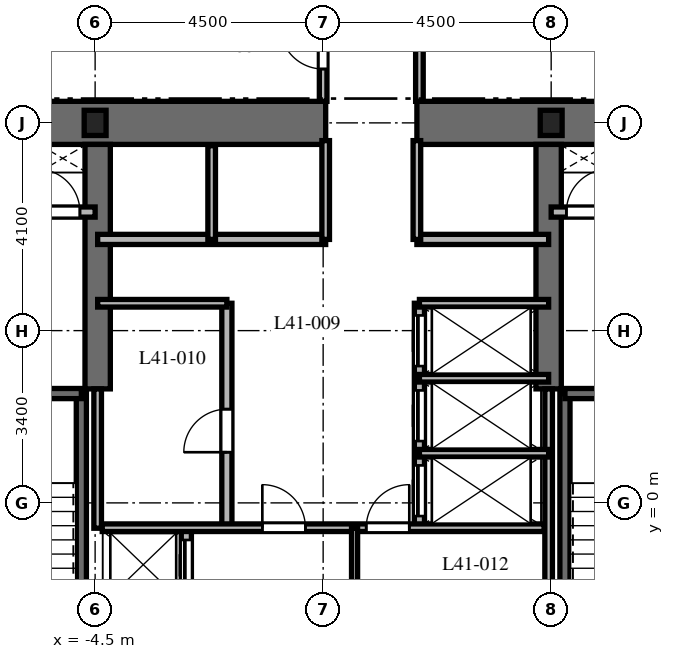
"""IFC4 building model, lengths in metres.
Left out: names, types, materials, properties, quantities, classifications, styles, units other than length and angle.
Written with IfcOpenShell. Run it as: python <this file> out.ifc"""

import sys

from ifc_helpers import new_model, si_unit, direction, frame, frame_2d, origin, origin_2d, place, context, subcontext, project, spatial, rectangle, i_section, extrude, element, fill, save


model = new_model("IFC4")
c1 = context("Model", 3, precision=1e-05, world=origin(), true_north=direction((0.0, 1.0)))
c2 = subcontext(c1, "Body", "Model", "MODEL_VIEW")
j1 = project(units=[si_unit("LENGTHUNIT", "METRE"), si_unit("PLANEANGLEUNIT", "RADIAN")], contexts=[c1])
p1 = place(None, origin())
s1 = spatial("IfcSite", under=j1, at=p1, CompositionType="ELEMENT")
p2 = place(p1, origin())
s2 = spatial("IfcBuilding", under=s1, at=p2, CompositionType="ELEMENT")
p3 = place(p2, frame((0.0, 0.0, 166.5)))
s3 = spatial("IfcBuildingStorey", under=s2, at=p3, CompositionType="ELEMENT", Elevation=166.5)
p4 = place(p3, frame((-9.425, 7.5, 0.0), z_axis=(0.0, 0.0, 1.0), x_axis=(1.0, 0.0, 0.0)))
e1 = element("IfcWall", 1, at=p4, inside=s3, PredefinedType="SHEAR", context=c2, shape_type="SweptSolid", body=[
    extrude(rectangle(XDim=9.475, YDim=0.85, at=frame_2d((4.738, 0.0))), origin(), (0.0, 0.0, 1.0), 3.7),
])
p5 = place(p3, frame((1.85, 7.5, 0.0), z_axis=(0.0, 0.0, 1.0), x_axis=(1.0, 0.0, 0.0)))
e2 = element("IfcWall", 2, at=p5, inside=s3, PredefinedType="SHEAR", context=c2, shape_type="SweptSolid", body=[
    extrude(rectangle(XDim=7.575, YDim=0.85, at=frame_2d((3.788, 0.0))), origin(), (0.0, 0.0, 1.0), 3.7),
])
for number, where, z_axis, x_axis in (
    (3, (-4.45, 2.25, 0.0), (0.0, 0.0, 1.0), (0.0, 1.0, 0.0)),
    (4, (4.45, 2.25, 0.0), (0.0, 0.0, 1.0), (0.0, 1.0, 0.0)),
):
    element("IfcWall", number, at=place(p3, frame(where, z_axis=z_axis, x_axis=x_axis)), inside=s3, PredefinedType="SHEAR", context=c2, shape_type="SweptSolid", body=[
        extrude(rectangle(XDim=4.825, YDim=0.5, at=frame_2d((2.413, 0.0))), origin(), (0.0, 0.0, 1.0), 3.7),
    ])
p6 = place(p3, frame((-4.772, -6.985, 0.0), z_axis=(0.0, 0.0, 1.0), x_axis=(0.0, 1.0, 0.0)))
e5 = element("IfcWall", 5, at=p6, inside=s3, PredefinedType="SHEAR", context=c2, shape_type="SweptSolid", body=[
    extrude(rectangle(XDim=9.143, YDim=0.2, at=frame_2d((4.572, 0.0))), origin(), (0.0, 0.0, 1.0), 3.7),
])
p7 = place(p3, frame((-8.458, 2.158, 0.0), z_axis=(0.0, 0.0, 1.0), x_axis=(1.0, 0.0, 0.0)))
e6 = element("IfcWall", 6, at=p7, inside=s3, PredefinedType="SHEAR", context=c2, shape_type="SweptSolid", body=[
    extrude(rectangle(XDim=3.686, YDim=0.2, at=frame_2d((1.843, 0.0))), origin(), (0.0, 0.0, 1.0), 3.7),
])
p8 = place(p7, frame((1.3, 0.0, 0.0)))
e7 = element("IfcOpeningElement", 7, at=p8, cuts=e6, PredefinedType="OPENING", context=c2, shape_type="SweptSolid", body=[
    extrude(rectangle(XDim=1.0, YDim=2.15, at=frame_2d((0.5, 1.075))), frame((0.0, 0.11, 0.0), z_axis=(0.0, -1.0, 0.0), x_axis=(1.0, 0.0, 0.0)), (0.0, 0.0, 1.0), 0.22),
])
p9 = place(p3, frame((4.772, -6.985, 0.0), z_axis=(0.0, 0.0, 1.0), x_axis=(0.0, 1.0, 0.0)))
e8 = element("IfcWall", 8, at=p9, inside=s3, PredefinedType="SHEAR", context=c2, shape_type="SweptSolid", body=[
    extrude(rectangle(XDim=9.143, YDim=0.2, at=frame_2d((4.572, 0.0))), origin(), (0.0, 0.0, 1.0), 3.7),
])
p10 = place(p3, frame((4.772, 2.158, 0.0), z_axis=(0.0, 0.0, 1.0), x_axis=(1.0, 0.0, 0.0)))
e9 = element("IfcWall", 9, at=p10, inside=s3, PredefinedType="SHEAR", context=c2, shape_type="SweptSolid", body=[
    extrude(rectangle(XDim=3.686, YDim=0.2, at=frame_2d((1.843, 0.0))), origin(), (0.0, 0.0, 1.0), 3.7),
])
p11 = place(p10, frame((1.35, 0.0, 0.0)))
e10 = element("IfcOpeningElement", 10, at=p11, cuts=e9, PredefinedType="OPENING", context=c2, shape_type="SweptSolid", body=[
    extrude(rectangle(XDim=1.0, YDim=2.15, at=frame_2d((0.5, 1.075))), frame((0.0, 0.11, 0.0), z_axis=(0.0, -1.0, 0.0), x_axis=(1.0, 0.0, 0.0)), (0.0, 0.0, 1.0), 0.22),
])
for number, where, z_axis, x_axis in (
    (11, (4.5, 7.5, 0.0), (0.0, 0.0, 1.0), (1.0, 0.0, 0.0)),
    (12, (-4.5, 7.5, 0.0), (0.0, 0.0, 1.0), (1.0, 0.0, 0.0)),
):
    element("IfcColumn", number, at=place(p3, frame(where, z_axis=z_axis, x_axis=x_axis)), inside=s3, PredefinedType="COLUMN", context=c2, shape_type="SweptSolid", body=[
        extrude(i_section(OverallWidth=0.432, OverallDepth=0.498, WebThickness=0.056, FlangeThickness=0.089, at=origin_2d()), origin(), (0.0, 0.0, 1.0), 3.7),
    ])
p12 = place(p3, frame((-8.55, 5.74, 0.0), z_axis=(0.0, 0.0, 1.0), x_axis=(1.0, 0.0, 0.0)))
e13 = element("IfcWall", 13, at=p12, inside=s3, PredefinedType="PARTITIONING", context=c2, shape_type="SweptSolid", body=[
    extrude(rectangle(XDim=4.05, YDim=0.2, at=frame_2d((2.025, 0.0))), origin(), (0.0, 0.0, 1.0), 3.38),
])
p13 = place(p12, frame((0.75, 0.0, 0.0)))
e14 = element("IfcOpeningElement", 14, at=p13, cuts=e13, PredefinedType="OPENING", context=c2, shape_type="SweptSolid", body=[
    extrude(rectangle(XDim=1.1, YDim=2.2, at=frame_2d((0.55, 1.1))), frame((0.0, 0.11, 0.0), z_axis=(0.0, -1.0, 0.0), x_axis=(1.0, 0.0, 0.0)), (0.0, 0.0, 1.0), 0.22),
])
p14 = place(p12, frame((2.9, 0.0, 0.0)))
e15 = element("IfcOpeningElement", 15, at=p14, cuts=e13, PredefinedType="OPENING", context=c2, shape_type="SweptSolid", body=[
    extrude(rectangle(XDim=0.85, YDim=2.03, at=frame_2d((0.425, 1.015))), frame((0.0, 0.11, 0.0), z_axis=(0.0, -1.0, 0.0), x_axis=(1.0, 0.0, 0.0)), (0.0, 0.0, 1.0), 0.22),
])
p15 = place(p3, frame((4.5, 5.74, 0.0), z_axis=(0.0, 0.0, 1.0), x_axis=(1.0, 0.0, 0.0)))
e16 = element("IfcWall", 16, at=p15, inside=s3, PredefinedType="PARTITIONING", context=c2, shape_type="SweptSolid", body=[
    extrude(rectangle(XDim=4.05, YDim=0.2, at=frame_2d((2.025, 0.0))), origin(), (0.0, 0.0, 1.0), 3.38),
])
p16 = place(p15, frame((0.3, 0.0, 0.0)))
e17 = element("IfcOpeningElement", 17, at=p16, cuts=e16, PredefinedType="OPENING", context=c2, shape_type="SweptSolid", body=[
    extrude(rectangle(XDim=0.85, YDim=2.03, at=frame_2d((0.425, 1.015))), frame((0.0, 0.11, 0.0), z_axis=(0.0, -1.0, 0.0), x_axis=(1.0, 0.0, 0.0)), (0.0, 0.0, 1.0), 0.22),
])
p17 = place(p15, frame((2.15, 0.0, 0.0)))
e18 = element("IfcOpeningElement", 18, at=p17, cuts=e16, PredefinedType="OPENING", context=c2, shape_type="SweptSolid", body=[
    extrude(rectangle(XDim=1.1, YDim=2.2, at=frame_2d((0.55, 1.1))), frame((0.0, 0.11, 0.0), z_axis=(0.0, -1.0, 0.0), x_axis=(1.0, 0.0, 0.0)), (0.0, 0.0, 1.0), 0.22),
])
p18 = place(p3, frame((-2.7, -1.972, 0.0), z_axis=(0.0, 0.0, 1.0), x_axis=(0.0, 1.0, 0.0)))
e19 = element("IfcWall", 19, at=p18, inside=s3, PredefinedType="PARTITIONING", context=c2, shape_type="SweptSolid", body=[
    extrude(rectangle(XDim=1.472, YDim=0.2, at=frame_2d((0.736, 0.0))), origin(), (0.0, 0.0, 1.0), 3.38),
])
p19 = place(p18, frame((0.24, 0.0, 0.0)))
e20 = element("IfcOpeningElement", 20, at=p19, cuts=e19, PredefinedType="OPENING", context=c2, shape_type="SweptSolid", body=[
    extrude(rectangle(XDim=1.0, YDim=2.2, at=frame_2d((0.5, 1.1))), frame((0.0, 0.11, 0.0), z_axis=(0.0, -1.0, 0.0), x_axis=(1.0, 0.0, 0.0)), (0.0, 0.0, 1.0), 0.22),
])
p20 = place(p3, frame((-4.45, 5.2, 0.0), z_axis=(0.0, 0.0, 1.0), x_axis=(1.0, 0.0, 0.0)))
e21 = element("IfcWall", 21, at=p20, inside=s3, PredefinedType="PARTITIONING", context=c2, shape_type="SweptSolid", body=[
    extrude(rectangle(XDim=4.5, YDim=0.2, at=frame_2d((2.25, 0.0))), origin(), (0.0, 0.0, 1.0), 3.38),
])
p21 = place(p3, frame((1.85, 5.2, 0.0), z_axis=(0.0, 0.0, 1.0), x_axis=(1.0, 0.0, 0.0)))
e22 = element("IfcWall", 22, at=p21, inside=s3, PredefinedType="PARTITIONING", context=c2, shape_type="SweptSolid", body=[
    extrude(rectangle(XDim=2.6, YDim=0.2, at=frame_2d((1.3, 0.0))), origin(), (0.0, 0.0, 1.0), 3.38),
])
p22 = place(p3, frame((-2.2, 5.2, 0.0), z_axis=(0.0, 0.0, 1.0), x_axis=(0.0, 1.0, 0.0)))
e23 = element("IfcWall", 23, at=p22, inside=s3, PredefinedType="PARTITIONING", context=c2, shape_type="SweptSolid", body=[
    extrude(rectangle(XDim=1.85, YDim=0.15, at=frame_2d((0.925, 0.0))), origin(), (0.0, 0.0, 1.0), 3.38),
])
for number, where, z_axis, x_axis in (
    (24, (0.05, 5.2, 0.0), (0.0, 0.0, 1.0), (0.0, 1.0, 0.0)),
    (25, (1.85, 5.2, 0.0), (0.0, 0.0, 1.0), (0.0, 1.0, 0.0)),
):
    element("IfcWall", number, at=place(p3, frame(where, z_axis=z_axis, x_axis=x_axis)), inside=s3, PredefinedType="PARTITIONING", context=c2, shape_type="SweptSolid", body=[
        extrude(rectangle(XDim=1.95, YDim=0.15, at=frame_2d((0.975, 0.0))), origin(), (0.0, 0.0, 1.0), 3.38),
    ])
p23 = place(p3, frame((-4.45, -0.5, 0.0), z_axis=(0.0, 0.0, 1.0), x_axis=(0.0, 1.0, 0.0)))
e26 = element("IfcWall", 26, at=p23, inside=s3, PredefinedType="PARTITIONING", context=c2, shape_type="SweptSolid", body=[
    extrude(rectangle(XDim=2.75, YDim=0.15, at=frame_2d((1.375, 0.0))), origin(), (0.0, 0.0, 1.0), 3.38),
])
p24 = place(p3, frame((4.45, -1.972, 0.0), z_axis=(0.0, 0.0, 1.0), x_axis=(0.0, 1.0, 0.0)))
e27 = element("IfcWall", 27, at=p24, inside=s3, PredefinedType="PARTITIONING", context=c2, shape_type="SweptSolid", body=[
    extrude(rectangle(XDim=4.222, YDim=0.15, at=frame_2d((2.111, 0.0))), origin(), (0.0, 0.0, 1.0), 3.38),
])
p25 = place(p3, frame((-1.9, -0.5, 0.0), z_axis=(0.0, 0.0, 1.0), x_axis=(0.0, 1.0, 0.0)))
e28 = element("IfcWall", 28, at=p25, inside=s3, PredefinedType="PARTITIONING", context=c2, shape_type="SweptSolid", body=[
    extrude(rectangle(XDim=4.44, YDim=0.2, at=frame_2d((2.22, 0.0))), origin(), (0.0, 0.0, 1.0), 3.38),
])
p26 = place(p25, frame((1.5, 0.0, 0.0)))
e29 = element("IfcOpeningElement", 29, at=p26, cuts=e28, PredefinedType="OPENING", context=c2, shape_type="SweptSolid", body=[
    extrude(rectangle(XDim=0.85, YDim=2.03, at=frame_2d((0.425, 1.015))), frame((0.0, 0.11, 0.0), z_axis=(0.0, -1.0, 0.0), x_axis=(1.0, 0.0, 0.0)), (0.0, 0.0, 1.0), 0.22),
])
p27 = place(p3, frame((-4.45, 3.94, 0.0), z_axis=(0.0, 0.0, 1.0), x_axis=(1.0, 0.0, 0.0)))
e30 = element("IfcWall", 30, at=p27, inside=s3, PredefinedType="PARTITIONING", context=c2, shape_type="SweptSolid", body=[
    extrude(rectangle(XDim=2.55, YDim=0.15, at=frame_2d((1.275, 0.0))), origin(), (0.0, 0.0, 1.0), 3.38),
])
p28 = place(p3, frame((1.9, -0.5, 0.0), z_axis=(0.0, 0.0, 1.0), x_axis=(0.0, 1.0, 0.0)))
e31 = element("IfcWall", 31, at=p28, inside=s3, PredefinedType="PARTITIONING", context=c2, shape_type="SweptSolid", body=[
    extrude(rectangle(XDim=4.44, YDim=0.2, at=frame_2d((2.22, 0.0))), origin(), (0.0, 0.0, 1.0), 3.38),
])
p29 = place(p28, frame((0.24, 0.0, 0.0)))
e32 = element("IfcOpeningElement", 32, at=p29, cuts=e31, PredefinedType="OPENING", context=c2, shape_type="SweptSolid", body=[
    extrude(rectangle(XDim=1.0, YDim=2.2, at=frame_2d((0.5, 1.1))), frame((0.0, 0.11, 0.0), z_axis=(0.0, -1.0, 0.0), x_axis=(1.0, 0.0, 0.0)), (0.0, 0.0, 1.0), 0.22),
])
p30 = place(p28, frame((1.72, 0.0, 0.0)))
e33 = element("IfcOpeningElement", 33, at=p30, cuts=e31, PredefinedType="OPENING", context=c2, shape_type="SweptSolid", body=[
    extrude(rectangle(XDim=1.0, YDim=2.2, at=frame_2d((0.5, 1.1))), frame((0.0, 0.11, 0.0), z_axis=(0.0, -1.0, 0.0), x_axis=(1.0, 0.0, 0.0)), (0.0, 0.0, 1.0), 0.22),
])
p31 = place(p28, frame((3.2, 0.0, 0.0)))
e34 = element("IfcOpeningElement", 34, at=p31, cuts=e31, PredefinedType="OPENING", context=c2, shape_type="SweptSolid", body=[
    extrude(rectangle(XDim=1.0, YDim=2.2, at=frame_2d((0.5, 1.1))), frame((0.0, 0.11, 0.0), z_axis=(0.0, -1.0, 0.0), x_axis=(1.0, 0.0, 0.0)), (0.0, 0.0, 1.0), 0.22),
])
for number, where, z_axis, x_axis in (
    (35, (1.9, 3.94, 0.0), (0.0, 0.0, 1.0), (1.0, 0.0, 0.0)),
    (36, (1.9, 0.98, 0.0), (0.0, 0.0, 1.0), (1.0, 0.0, 0.0)),
    (37, (1.9, 2.46, 0.0), (0.0, 0.0, 1.0), (1.0, 0.0, 0.0)),
):
    element("IfcWall", number, at=place(p3, frame(where, z_axis=z_axis, x_axis=x_axis)), inside=s3, PredefinedType="PARTITIONING", context=c2, shape_type="SweptSolid", body=[
        extrude(rectangle(XDim=2.55, YDim=0.15, at=frame_2d((1.275, 0.0))), origin(), (0.0, 0.0, 1.0), 3.38),
    ])
p32 = place(p3, frame((-4.36, -0.49, 0.0), z_axis=(0.0, 0.0, 1.0), x_axis=(1.0, 0.0, 0.0)))
e38 = element("IfcWall", 38, at=p32, inside=s3, PredefinedType="PARTITIONING", context=c2, shape_type="SweptSolid", body=[
    extrude(rectangle(XDim=8.72, YDim=0.15, at=frame_2d((4.36, 0.0))), origin(), (0.0, 0.0, 1.0), 3.38),
])
p33 = place(p32, frame((3.16, 0.0, 0.0)))
e39 = element("IfcOpeningElement", 39, at=p33, cuts=e38, PredefinedType="OPENING", context=c2, shape_type="SweptSolid", body=[
    extrude(rectangle(XDim=0.85, YDim=2.03, at=frame_2d((0.425, 1.015))), frame((0.0, 0.085, 0.0), z_axis=(0.0, -1.0, 0.0), x_axis=(1.0, 0.0, 0.0)), (0.0, 0.0, 1.0), 0.17),
])
p34 = place(p32, frame((5.21, 0.0, 0.0)))
e40 = element("IfcOpeningElement", 40, at=p34, cuts=e38, PredefinedType="OPENING", context=c2, shape_type="SweptSolid", body=[
    extrude(rectangle(XDim=0.85, YDim=2.03, at=frame_2d((0.425, 1.015))), frame((0.0, 0.085, 0.0), z_axis=(0.0, -1.0, 0.0), x_axis=(1.0, 0.0, 0.0)), (0.0, 0.0, 1.0), 0.17),
])
p35 = place(p3, frame((0.62, -1.972, 0.0), z_axis=(0.0, 0.0, 1.0), x_axis=(0.0, 1.0, 0.0)))
e41 = element("IfcWall", 41, at=p35, inside=s3, PredefinedType="PARTITIONING", context=c2, shape_type="SweptSolid", body=[
    extrude(rectangle(XDim=1.472, YDim=0.12, at=frame_2d((0.736, 0.0))), origin(), (0.0, 0.0, 1.0), 3.38),
])
p36 = place(p3, frame((1.9, 10.05, 0.0), z_axis=(0.0, 0.0, 1.0), x_axis=(0.0, -1.0, 0.0)))
e42 = element("IfcWall", 42, at=p36, inside=s3, PredefinedType="PARTITIONING", context=c2, shape_type="SweptSolid", body=[
    extrude(rectangle(XDim=2.125, YDim=0.15, at=frame_2d((1.062, 0.0))), origin(), (0.0, 0.0, 1.0), 3.38),
])
p37 = place(p3, frame((0.0, 7.925, 0.0), z_axis=(0.0, 0.0, 1.0), x_axis=(0.0, 1.0, 0.0)))
e43 = element("IfcWall", 43, at=p37, inside=s3, PredefinedType="PARTITIONING", context=c2, shape_type="SweptSolid", body=[
    extrude(rectangle(XDim=2.125, YDim=0.15, at=frame_2d((1.062, 0.0))), origin(), (0.0, 0.0, 1.0), 3.38),
])
p38 = place(p37, frame((0.638, 0.0, 0.0)))
e44 = element("IfcOpeningElement", 44, at=p38, cuts=e43, PredefinedType="OPENING", context=c2, shape_type="SweptSolid", body=[
    extrude(rectangle(XDim=0.85, YDim=2.03, at=frame_2d((0.425, 1.015))), frame((0.0, 0.085, 0.0), z_axis=(0.0, -1.0, 0.0), x_axis=(1.0, 0.0, 0.0)), (0.0, 0.0, 1.0), 0.17),
])
p39 = place(p14, origin())
e45 = element("IfcDoor", 45, at=p39, inside=s3, OperationType="SINGLE_SWING_LEFT", PredefinedType="DOOR", context=c2, shape_type="SweptSolid", body=[
    extrude(rectangle(XDim=0.85, YDim=2.03, at=frame_2d((0.425, 1.015))), frame((0.0, 0.025, 0.0), z_axis=(0.0, -1.0, 0.0), x_axis=(1.0, 0.0, 0.0)), (0.0, 0.0, 1.0), 0.05),
])
fill(e15, e45)
p40 = place(p16, origin())
e46 = element("IfcDoor", 46, at=p40, inside=s3, OperationType="SINGLE_SWING_RIGHT", PredefinedType="DOOR", context=c2, shape_type="SweptSolid", body=[
    extrude(rectangle(XDim=0.85, YDim=2.03, at=frame_2d((0.425, 1.015))), frame((0.0, 0.025, 0.0), z_axis=(0.0, -1.0, 0.0), x_axis=(1.0, 0.0, 0.0)), (0.0, 0.0, 1.0), 0.05),
])
fill(e17, e46)
p41 = place(p19, origin())
e47 = element("IfcDoor", 47, at=p41, inside=s3, OperationType="SLIDING_TO_LEFT", PredefinedType="DOOR", context=c2, shape_type="SweptSolid", body=[
    extrude(rectangle(XDim=1.0, YDim=2.2, at=frame_2d((0.5, 1.1))), frame((0.0, 0.025, 0.0), z_axis=(0.0, -1.0, 0.0), x_axis=(1.0, 0.0, 0.0)), (0.0, 0.0, 1.0), 0.05),
])
fill(e20, e47)
p42 = place(p26, origin())
e48 = element("IfcDoor", 48, at=p42, inside=s3, OperationType="SINGLE_SWING_LEFT", PredefinedType="DOOR", context=c2, shape_type="SweptSolid", body=[
    extrude(rectangle(XDim=0.85, YDim=2.03, at=frame_2d((0.425, 1.015))), frame((0.0, 0.025, 0.0), z_axis=(0.0, -1.0, 0.0), x_axis=(1.0, 0.0, 0.0)), (0.0, 0.0, 1.0), 0.05),
])
fill(e29, e48)
p43 = place(p29, origin())
e49 = element("IfcDoor", 49, at=p43, inside=s3, OperationType="SLIDING_TO_RIGHT", PredefinedType="DOOR", context=c2, shape_type="SweptSolid", body=[
    extrude(rectangle(XDim=1.0, YDim=2.2, at=frame_2d((0.5, 1.1))), frame((0.0, 0.025, 0.0), z_axis=(0.0, -1.0, 0.0), x_axis=(1.0, 0.0, 0.0)), (0.0, 0.0, 1.0), 0.05),
])
fill(e32, e49)
p44 = place(p30, origin())
e50 = element("IfcDoor", 50, at=p44, inside=s3, OperationType="SLIDING_TO_RIGHT", PredefinedType="DOOR", context=c2, shape_type="SweptSolid", body=[
    extrude(rectangle(XDim=1.0, YDim=2.2, at=frame_2d((0.5, 1.1))), frame((0.0, 0.025, 0.0), z_axis=(0.0, -1.0, 0.0), x_axis=(1.0, 0.0, 0.0)), (0.0, 0.0, 1.0), 0.05),
])
fill(e33, e50)
p45 = place(p31, origin())
e51 = element("IfcDoor", 51, at=p45, inside=s3, OperationType="SLIDING_TO_RIGHT", PredefinedType="DOOR", context=c2, shape_type="SweptSolid", body=[
    extrude(rectangle(XDim=1.0, YDim=2.2, at=frame_2d((0.5, 1.1))), frame((0.0, 0.025, 0.0), z_axis=(0.0, -1.0, 0.0), x_axis=(1.0, 0.0, 0.0)), (0.0, 0.0, 1.0), 0.05),
])
fill(e34, e51)
p46 = place(p33, origin())
e52 = element("IfcDoor", 52, at=p46, inside=s3, OperationType="SINGLE_SWING_LEFT", PredefinedType="DOOR", context=c2, shape_type="SweptSolid", body=[
    extrude(rectangle(XDim=0.85, YDim=2.03, at=frame_2d((0.425, 1.015))), frame((0.0, 0.025, 0.0), z_axis=(0.0, -1.0, 0.0), x_axis=(1.0, 0.0, 0.0)), (0.0, 0.0, 1.0), 0.05),
])
fill(e39, e52)
p47 = place(p34, origin())
e53 = element("IfcDoor", 53, at=p47, inside=s3, OperationType="SINGLE_SWING_RIGHT", PredefinedType="DOOR", context=c2, shape_type="SweptSolid", body=[
    extrude(rectangle(XDim=0.85, YDim=2.03, at=frame_2d((0.425, 1.015))), frame((0.0, 0.025, 0.0), z_axis=(0.0, -1.0, 0.0), x_axis=(1.0, 0.0, 0.0)), (0.0, 0.0, 1.0), 0.05),
])
fill(e40, e53)
p48 = place(p38, origin())
e54 = element("IfcDoor", 54, at=p48, inside=s3, OperationType="SINGLE_SWING_RIGHT", PredefinedType="DOOR", context=c2, shape_type="SweptSolid", body=[
    extrude(rectangle(XDim=0.85, YDim=2.03, at=frame_2d((0.425, 1.015))), frame((0.0, 0.025, 0.0), z_axis=(0.0, -1.0, 0.0), x_axis=(1.0, 0.0, 0.0)), (0.0, 0.0, 1.0), 0.05),
])
fill(e44, e54)
save(model, sys.argv[1])
